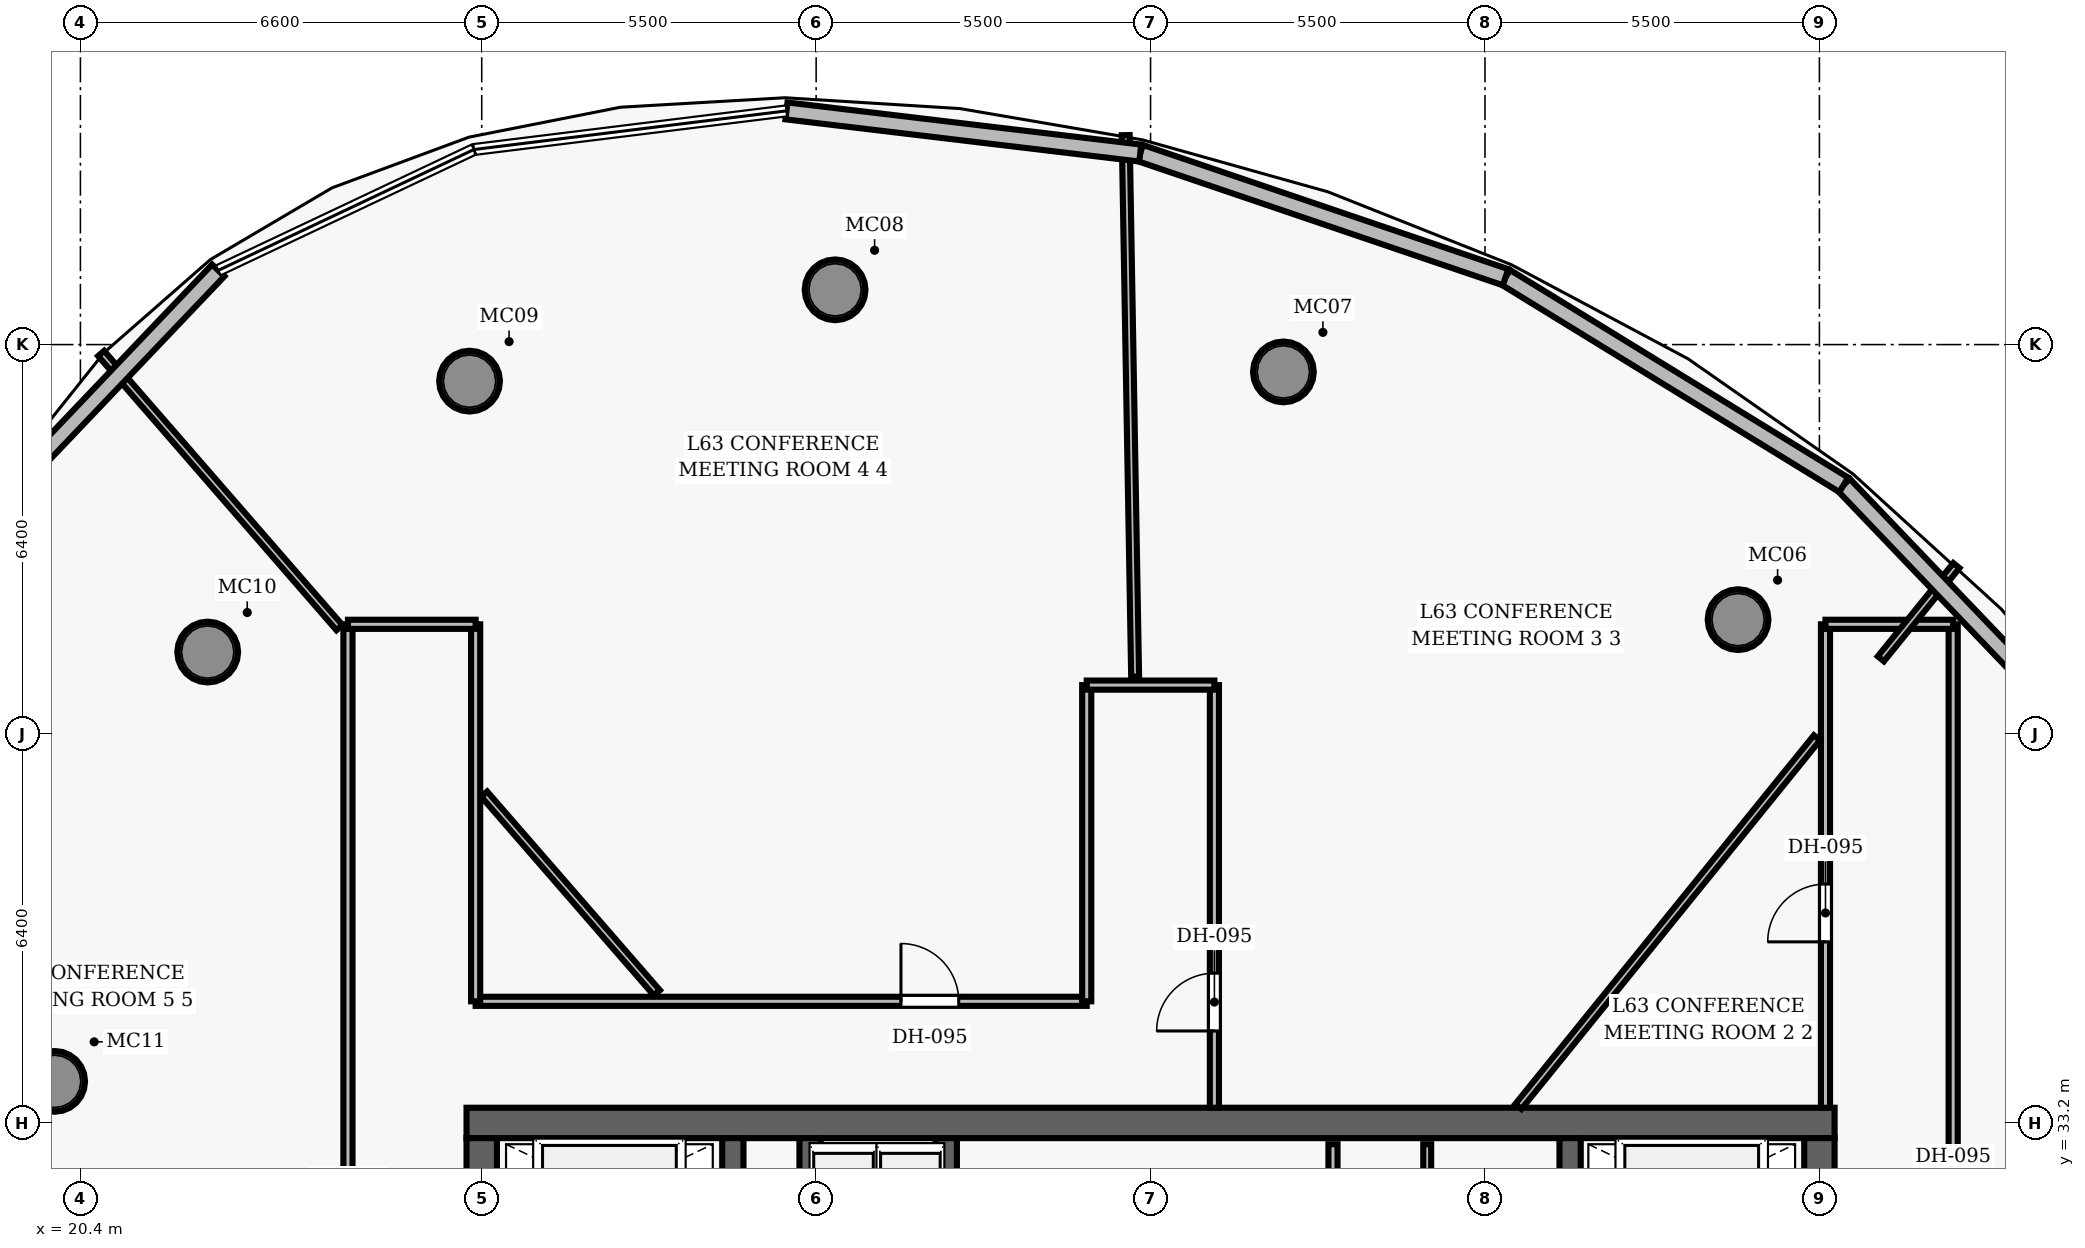
"""IFC4 building model, lengths in metres.
Left out: names, types, materials, properties, quantities, classifications, styles, units other than length and angle.
Written with IfcOpenShell. Run it as: python <this file> out.ifc"""

import sys

from ifc_helpers import new_model, si_unit, direction, frame, frame_2d, origin, origin_2d, place, context, subcontext, project, spatial, rectangle, hollow_circle, extrude, element, fill, save


model = new_model("IFC4")
c1 = context("Model", 3, precision=1e-05, world=origin(), true_north=direction((0.0, 1.0)))
c2 = subcontext(c1, "Body", "Model", "MODEL_VIEW")
j1 = project(units=[si_unit("LENGTHUNIT", "METRE"), si_unit("PLANEANGLEUNIT", "RADIAN")], contexts=[c1])
p1 = place(None, origin())
s1 = spatial("IfcSite", under=j1, at=p1, CompositionType="ELEMENT")
p2 = place(p1, origin())
s2 = spatial("IfcBuilding", under=s1, at=p2, CompositionType="ELEMENT")
p3 = place(p2, frame((0.0, 0.0, 249.75)))
s3 = spatial("IfcBuildingStorey", under=s2, at=p3, CompositionType="ELEMENT", Elevation=249.75)
p4 = place(p3, frame((26.75, 33.2, 0.0), z_axis=(0.0, 0.0, 1.0), x_axis=(1.0, 0.0, 0.0)))
e1 = element("IfcWall", 1, at=p4, inside=s3, PredefinedType="SHEAR", context=c2, shape_type="SweptSolid", body=[
    extrude(rectangle(XDim=22.5, YDim=0.5, at=frame_2d((11.25, 0.0))), origin(), (0.0, 0.0, 1.0), 3.85),
])
p5 = place(p3, frame((27.0, 19.05, 0.0), z_axis=(0.0, 0.0, 1.0), x_axis=(0.0, 1.0, 0.0)))
e2 = element("IfcWall", 2, at=p5, inside=s3, PredefinedType="SHEAR", context=c2, shape_type="SweptSolid", body=[
    extrude(rectangle(XDim=13.9, YDim=0.5, at=frame_2d((6.95, 0.0))), origin(), (0.0, 0.0, 1.0), 3.85),
])
p6 = place(p5, frame((8.2, 0.0, 0.0)))
e3 = element("IfcOpeningElement", 3, at=p6, cuts=e2, PredefinedType="OPENING", context=c2, shape_type="SweptSolid", body=[
    extrude(rectangle(XDim=1.05, YDim=2.15, at=frame_2d((0.525, 1.075))), frame((0.0, 0.26, 0.0), z_axis=(0.0, -1.0, 0.0), x_axis=(1.0, 0.0, 0.0)), (0.0, 0.0, 1.0), 0.52),
])
p7 = place(p3, frame((49.0, 19.05, 0.0), z_axis=(0.0, 0.0, 1.0), x_axis=(0.0, 1.0, 0.0)))
e4 = element("IfcWall", 4, at=p7, inside=s3, PredefinedType="SHEAR", context=c2, shape_type="SweptSolid", body=[
    extrude(rectangle(XDim=13.9, YDim=0.5, at=frame_2d((6.95, 0.0))), origin(), (0.0, 0.0, 1.0), 3.85),
])
p8 = place(p7, frame((8.2, 0.0, 0.0)))
e5 = element("IfcOpeningElement", 5, at=p8, cuts=e4, PredefinedType="OPENING", context=c2, shape_type="SweptSolid", body=[
    extrude(rectangle(XDim=1.05, YDim=2.15, at=frame_2d((0.525, 1.075))), frame((0.0, 0.26, 0.0), z_axis=(0.0, -1.0, 0.0), x_axis=(1.0, 0.0, 0.0)), (0.0, 0.0, 1.0), 0.52),
])
for number, where, z_axis, x_axis in (
    (6, (31.13, 19.05, 0.0), (0.0, 0.0, 1.0), (0.0, 1.0, 0.0)),
    (7, (44.9, 19.05, 0.0), (0.0, 0.0, 1.0), (0.0, 1.0, 0.0)),
):
    element("IfcWall", number, at=place(p3, frame(where, z_axis=z_axis, x_axis=x_axis)), inside=s3, PredefinedType="SHEAR", context=c2, shape_type="SweptSolid", body=[
        extrude(rectangle(XDim=13.9, YDim=0.35, at=frame_2d((6.95, 0.0))), origin(), (0.0, 0.0, 1.0), 3.85),
    ])
for number, where, z_axis, x_axis in (
    (8, (47.662, 41.477, 0.0), (0.0, 0.0, 1.0), (1.0, 0.0, 0.0)),
    (9, (40.185, 45.551, 0.0), (0.0, 0.0, 1.0), (1.0, 0.0, 0.0)),
    (10, (32.812, 46.901, 0.0), (0.0, 0.0, 1.0), (1.0, 0.0, 0.0)),
    (11, (26.8, 45.399, 0.0), (0.0, 0.0, 1.0), (1.0, 0.0, 0.0)),
    (12, (22.494, 40.944, 0.0), (0.0, 0.0, 1.0), (1.0, 0.0, 0.0)),
    (13, (19.976, 33.884, 0.0), (0.0, 0.0, 1.0), (1.0, 0.0, 0.0)),
):
    element("IfcColumn", number, at=place(p3, frame(where, z_axis=z_axis, x_axis=x_axis)), inside=s3, PredefinedType="COLUMN", context=c2, shape_type="SweptSolid", body=[
        extrude(hollow_circle(Radius=0.5, WallThickness=0.045, at=origin_2d()), origin(), (0.0, 0.0, 1.0), 3.85),
    ])
p9 = place(p3, frame((34.64, 26.69, 0.0), z_axis=(0.0, 0.0, 1.0), x_axis=(0.0, 1.0, 0.0)))
e14 = element("IfcWall", 14, at=p9, inside=s3, PredefinedType="SHEAR", context=c2, shape_type="SweptSolid", body=[
    extrude(rectangle(XDim=6.26, YDim=0.35, at=frame_2d((3.13, 0.0))), origin(), (0.0, 0.0, 1.0), 3.85),
])
p10 = place(p9, frame((0.85, 0.0, 0.0)))
e15 = element("IfcOpeningElement", 15, at=p10, cuts=e14, PredefinedType="OPENING", context=c2, shape_type="SweptSolid", body=[
    extrude(rectangle(XDim=1.05, YDim=2.15, at=frame_2d((0.525, 1.075))), frame((0.0, 0.185, 0.0), z_axis=(0.0, -1.0, 0.0), x_axis=(1.0, 0.0, 0.0)), (0.0, 0.0, 1.0), 0.37),
])
p11 = place(p3, frame((32.4, 30.22, 0.0), z_axis=(0.0, 0.0, 1.0), x_axis=(0.0, 1.0, 0.0)))
e16 = element("IfcWall", 16, at=p11, inside=s3, PredefinedType="SHEAR", context=c2, shape_type="SweptSolid", body=[
    extrude(rectangle(XDim=2.73, YDim=0.35, at=frame_2d((1.365, 0.0))), origin(), (0.0, 0.0, 1.0), 3.04),
])
p12 = place(p3, frame((41.0, 28.95, 0.0), z_axis=(0.0, 0.0, 1.0), x_axis=(0.0, 1.0, 0.0)))
e17 = element("IfcWall", 17, at=p12, inside=s3, PredefinedType="PARTITIONING", context=c2, shape_type="SweptSolid", body=[
    extrude(rectangle(XDim=3.9, YDim=0.15, at=frame_2d((1.95, 0.0))), origin(), (0.0, 0.0, 1.0), 3.04),
])
p13 = place(p12, frame((0.7, 0.0, 0.0)))
e18 = element("IfcOpeningElement", 18, at=p13, cuts=e17, PredefinedType="OPENING", context=c2, shape_type="SweptSolid", body=[
    extrude(rectangle(XDim=0.85, YDim=2.1, at=frame_2d((0.425, 1.05))), frame((0.0, 0.085, 0.0), z_axis=(0.0, -1.0, 0.0), x_axis=(1.0, 0.0, 0.0)), (0.0, 0.0, 1.0), 0.17),
])
p14 = place(p3, frame((42.55, 28.1, 0.0), z_axis=(0.0, 0.0, 1.0), x_axis=(0.0, 1.0, 0.0)))
e19 = element("IfcWall", 19, at=p14, inside=s3, PredefinedType="PARTITIONING", context=c2, shape_type="SweptSolid", body=[
    extrude(rectangle(XDim=4.75, YDim=0.13, at=frame_2d((2.375, 0.0))), origin(), (0.0, 0.0, 1.0), 3.04),
])
p15 = place(p14, frame((0.55, 0.0, 0.0)))
e20 = element("IfcOpeningElement", 20, at=p15, cuts=e19, PredefinedType="OPENING", context=c2, shape_type="SweptSolid", body=[
    extrude(rectangle(XDim=0.85, YDim=2.1, at=frame_2d((0.425, 1.05))), frame((0.0, 0.075, 0.0), z_axis=(0.0, -1.0, 0.0), x_axis=(1.0, 0.0, 0.0)), (0.0, 0.0, 1.0), 0.15),
])
p16 = place(p14, frame((2.9, 0.0, 0.0)))
e21 = element("IfcOpeningElement", 21, at=p16, cuts=e19, PredefinedType="OPENING", context=c2, shape_type="SweptSolid", body=[
    extrude(rectangle(XDim=0.85, YDim=2.1, at=frame_2d((0.425, 1.05))), frame((0.0, 0.075, 0.0), z_axis=(0.0, -1.0, 0.0), x_axis=(1.0, 0.0, 0.0)), (0.0, 0.0, 1.0), 0.15),
])
p17 = place(p3, frame((26.9, 35.2, 0.0), z_axis=(0.0, 0.0, 1.0), x_axis=(1.0, 0.0, 0.0)))
e22 = element("IfcWall", 22, at=p17, inside=s3, PredefinedType="PARTITIONING", context=c2, shape_type="SweptSolid", body=[
    extrude(rectangle(XDim=10.05, YDim=0.15, at=frame_2d((5.025, 0.0))), origin(), (0.0, 0.0, 1.0), 3.04),
])
p18 = place(p17, frame((6.995, 0.0, 0.0)))
e23 = element("IfcOpeningElement", 23, at=p18, cuts=e22, PredefinedType="OPENING", context=c2, shape_type="SweptSolid", body=[
    extrude(rectangle(XDim=0.95, YDim=2.15, at=frame_2d((0.475, 1.075))), frame((0.0, 0.085, 0.0), z_axis=(0.0, -1.0, 0.0), x_axis=(1.0, 0.0, 0.0)), (0.0, 0.0, 1.0), 0.17),
])
p19 = place(p3, frame((24.8, 11.306, 0.0), z_axis=(0.0, 0.0, 1.0), x_axis=(0.0, 1.0, 0.0)))
e24 = element("IfcWall", 24, at=p19, inside=s3, PredefinedType="PARTITIONING", context=c2, shape_type="SweptSolid", body=[
    extrude(rectangle(XDim=30.094, YDim=0.15, at=frame_2d((15.047, 0.0))), origin(), (0.0, 0.0, 1.0), 3.04),
])
p20 = place(p19, frame((19.429, 0.0, 0.0)))
e25 = element("IfcOpeningElement", 25, at=p20, cuts=e24, PredefinedType="OPENING", context=c2, shape_type="SweptSolid", body=[
    extrude(rectangle(XDim=0.95, YDim=2.15, at=frame_2d((0.475, 1.075))), frame((0.0, 0.085, 0.0), z_axis=(0.0, -1.0, 0.0), x_axis=(1.0, 0.0, 0.0)), (0.0, 0.0, 1.0), 0.17),
])
p21 = place(p19, frame((10.994, 0.0, 0.0)))
e26 = element("IfcOpeningElement", 26, at=p21, cuts=e24, PredefinedType="OPENING", context=c2, shape_type="SweptSolid", body=[
    extrude(rectangle(XDim=1.5, YDim=2.2, at=frame_2d((0.75, 1.1))), frame((0.0, 0.085, 0.0), z_axis=(0.0, -1.0, 0.0), x_axis=(1.0, 0.0, 0.0)), (0.0, 0.0, 1.0), 0.17),
])
p22 = place(p3, frame((26.9, 35.2, 0.0), z_axis=(0.0, 0.0, 1.0), x_axis=(0.0, 1.0, 0.0)))
e27 = element("IfcWall", 27, at=p22, inside=s3, PredefinedType="PARTITIONING", context=c2, shape_type="SweptSolid", body=[
    extrude(rectangle(XDim=6.2, YDim=0.15, at=frame_2d((3.1, 0.0))), origin(), (0.0, 0.0, 1.0), 3.04),
])
p23 = place(p3, frame((24.8, 41.4, 0.0), z_axis=(0.0, 0.0, 1.0), x_axis=(1.0, 0.0, 0.0)))
e28 = element("IfcWall", 28, at=p23, inside=s3, PredefinedType="PARTITIONING", context=c2, shape_type="SweptSolid", body=[
    extrude(rectangle(XDim=2.1, YDim=0.15, at=frame_2d((1.05, 0.0))), origin(), (0.0, 0.0, 1.0), 3.04),
])
p24 = place(p3, frame((51.2, 10.6, 0.0), z_axis=(0.0, 0.0, 1.0), x_axis=(0.0, 1.0, 0.0)))
e29 = element("IfcWall", 29, at=p24, inside=s3, PredefinedType="PARTITIONING", context=c2, shape_type="SweptSolid", body=[
    extrude(rectangle(XDim=30.8, YDim=0.15, at=frame_2d((15.4, 0.0))), origin(), (0.0, 0.0, 1.0), 3.04),
])
p25 = place(p24, frame((20.494, 0.0, 0.0)))
e30 = element("IfcOpeningElement", 30, at=p25, cuts=e29, PredefinedType="OPENING", context=c2, shape_type="SweptSolid", body=[
    extrude(rectangle(XDim=0.95, YDim=2.15, at=frame_2d((0.475, 1.075))), frame((0.0, 0.085, 0.0), z_axis=(0.0, -1.0, 0.0), x_axis=(1.0, 0.0, 0.0)), (0.0, 0.0, 1.0), 0.17),
])
p26 = place(p24, frame((10.941, 0.0, 0.0)))
e31 = element("IfcOpeningElement", 31, at=p26, cuts=e29, PredefinedType="OPENING", context=c2, shape_type="SweptSolid", body=[
    extrude(rectangle(XDim=0.95, YDim=2.15, at=frame_2d((0.475, 1.075))), frame((0.0, 0.085, 0.0), z_axis=(0.0, -1.0, 0.0), x_axis=(1.0, 0.0, 0.0)), (0.0, 0.0, 1.0), 0.17),
])
p27 = place(p3, frame((49.1, 33.45, 0.0), z_axis=(0.0, 0.0, 1.0), x_axis=(0.0, 1.0, 0.0)))
e32 = element("IfcWall", 32, at=p27, inside=s3, PredefinedType="PARTITIONING", context=c2, shape_type="SweptSolid", body=[
    extrude(rectangle(XDim=7.95, YDim=0.15, at=frame_2d((3.975, 0.0))), origin(), (0.0, 0.0, 1.0), 3.04),
])
p28 = place(p27, frame((2.728, 0.0, 0.0)))
e33 = element("IfcOpeningElement", 33, at=p28, cuts=e32, PredefinedType="OPENING", context=c2, shape_type="SweptSolid", body=[
    extrude(rectangle(XDim=0.95, YDim=2.15, at=frame_2d((0.475, 1.075))), frame((0.0, 0.085, 0.0), z_axis=(0.0, -1.0, 0.0), x_axis=(1.0, 0.0, 0.0)), (0.0, 0.0, 1.0), 0.17),
])
p29 = place(p3, frame((49.1, 41.4, 0.0), z_axis=(0.0, 0.0, 1.0), x_axis=(1.0, 0.0, 0.0)))
e34 = element("IfcWall", 34, at=p29, inside=s3, PredefinedType="PARTITIONING", context=c2, shape_type="SweptSolid", body=[
    extrude(rectangle(XDim=2.1, YDim=0.15, at=frame_2d((1.05, 0.0))), origin(), (0.0, 0.0, 1.0), 3.04),
])
p30 = place(p3, frame((36.95, 35.2, 0.0), z_axis=(0.0, 0.0, 1.0), x_axis=(0.0, 1.0, 0.0)))
e35 = element("IfcWall", 35, at=p30, inside=s3, PredefinedType="PARTITIONING", context=c2, shape_type="SweptSolid", body=[
    extrude(rectangle(XDim=5.2, YDim=0.15, at=frame_2d((2.6, 0.0))), origin(), (0.0, 0.0, 1.0), 3.04),
])
p31 = place(p3, frame((39.05, 33.45, 0.0), z_axis=(0.0, 0.0, 1.0), x_axis=(0.0, 1.0, 0.0)))
e36 = element("IfcWall", 36, at=p31, inside=s3, PredefinedType="PARTITIONING", context=c2, shape_type="SweptSolid", body=[
    extrude(rectangle(XDim=6.95, YDim=0.15, at=frame_2d((3.475, 0.0))), origin(), (0.0, 0.0, 1.0), 3.04),
])
p32 = place(p31, frame((1.262, 0.0, 0.0)))
e37 = element("IfcOpeningElement", 37, at=p32, cuts=e36, PredefinedType="OPENING", context=c2, shape_type="SweptSolid", body=[
    extrude(rectangle(XDim=0.95, YDim=2.15, at=frame_2d((0.475, 1.075))), frame((0.0, 0.085, 0.0), z_axis=(0.0, -1.0, 0.0), x_axis=(1.0, 0.0, 0.0)), (0.0, 0.0, 1.0), 0.17),
])
p33 = place(p3, frame((36.95, 40.4, 0.0), z_axis=(0.0, 0.0, 1.0), x_axis=(1.0, 0.0, 0.0)))
e38 = element("IfcWall", 38, at=p33, inside=s3, PredefinedType="PARTITIONING", context=c2, shape_type="SweptSolid", body=[
    extrude(rectangle(XDim=2.1, YDim=0.15, at=frame_2d((1.05, 0.0))), origin(), (0.0, 0.0, 1.0), 3.04),
])
p34 = place(p3, frame((44.049, 33.47, 0.0), z_axis=(0.0, 0.0, 1.0), x_axis=(0.629319722443, 0.777146502883, 0.0)))
e39 = element("IfcWall", 39, at=p34, inside=s3, PredefinedType="PARTITIONING", context=c2, shape_type="SweptSolid", body=[
    extrude(rectangle(XDim=7.803, YDim=0.13, at=frame_2d((3.902, 0.0))), origin(), (0.0, 0.0, 1.0), 3.04),
])
p35 = place(p3, frame((50.011, 40.832, 0.0), z_axis=(0.0, 0.0, 1.0), x_axis=(0.629255162261, 0.777198778157, 0.0)))
e40 = element("IfcWall", 40, at=p35, inside=s3, PredefinedType="PARTITIONING", context=c2, shape_type="SweptSolid", body=[
    extrude(rectangle(XDim=1.974, YDim=0.13, at=frame_2d((0.987, 0.0))), origin(), (0.0, 0.0, 1.0), 3.04),
])
p36 = place(p3, frame((37.746, 40.54, 0.0), z_axis=(0.0, 0.0, 1.0), x_axis=(-0.017434428184, 0.999848008806, 0.0)))
e41 = element("IfcWall", 41, at=p36, inside=s3, PredefinedType="PARTITIONING", context=c2, shape_type="SweptSolid", body=[
    extrude(rectangle(XDim=8.906, YDim=0.13, at=frame_2d((4.453, 0.0))), origin(), (0.0, 0.0, 1.0), 3.04),
])
p37 = place(p3, frame((29.881, 35.34, 0.0), z_axis=(0.0, 0.0, 1.0), x_axis=(-0.656078202057, 0.754692912903, 0.0)))
e42 = element("IfcWall", 42, at=p37, inside=s3, PredefinedType="PARTITIONING", context=c2, shape_type="SweptSolid", body=[
    extrude(rectangle(XDim=4.33, YDim=0.13, at=frame_2d((2.165, 0.0))), origin(), (0.0, 0.0, 1.0), 3.04),
])
p38 = place(p3, frame((24.66, 41.346, 0.0), z_axis=(0.0, 0.0, 1.0), x_axis=(-0.656059320553, 0.754709326771, 0.0)))
e43 = element("IfcWall", 43, at=p38, inside=s3, PredefinedType="PARTITIONING", context=c2, shape_type="SweptSolid", body=[
    extrude(rectangle(XDim=5.974, YDim=0.13, at=frame_2d((2.987, 0.0))), origin(), (0.0, 0.0, 1.0), 3.04),
])
p39 = place(p3, frame((49.4, 43.694, 0.0), z_axis=(0.0, 0.0, 1.0), x_axis=(0.691260013962, -0.722606111998, 0.0)))
e44 = element("IfcWall", 44, at=p39, inside=s3, PredefinedType="SOLIDWALL", context=c2, shape_type="SweptSolid", body=[
    extrude(rectangle(XDim=6.527, YDim=0.28, at=frame_2d((3.263, 0.0))), origin(), (0.0, 0.0, 1.0), 3.625),
])
p40 = place(p3, frame((43.838, 47.108, 0.0), z_axis=(0.0, 0.0, 1.0), x_axis=(0.852253742536, -0.523128625038, 0.0)))
e45 = element("IfcWall", 45, at=p40, inside=s3, PredefinedType="SOLIDWALL", context=c2, shape_type="SweptSolid", body=[
    extrude(rectangle(XDim=6.526, YDim=0.28, at=frame_2d((3.263, 0.0))), origin(), (0.0, 0.0, 1.0), 3.625),
])
p41 = place(p3, frame((37.831, 49.15, 0.0), z_axis=(0.0, 0.0, 1.0), x_axis=(0.946816357847, -0.321774431107, 0.0)))
e46 = element("IfcWall", 46, at=p41, inside=s3, PredefinedType="SOLIDWALL", context=c2, shape_type="SweptSolid", body=[
    extrude(rectangle(XDim=6.345, YDim=0.28, at=frame_2d((3.173, 0.0))), origin(), (0.0, 0.0, 1.0), 3.625),
])
p42 = place(p3, frame((32.012, 49.843, 0.0), z_axis=(0.0, 0.0, 1.0), x_axis=(0.992975459994, -0.118320479415, 0.0)))
e47 = element("IfcWall", 47, at=p42, inside=s3, PredefinedType="SOLIDWALL", context=c2, shape_type="SweptSolid", body=[
    extrude(rectangle(XDim=5.86, YDim=0.28, at=frame_2d((2.93, 0.0))), origin(), (0.0, 0.0, 1.0), 3.625),
])
p43 = place(p3, frame((19.46, 43.853, 0.0), z_axis=(0.0, 0.0, 1.0), x_axis=(0.68967745757, 0.724116706422, 0.0)))
e48 = element("IfcWall", 48, at=p43, inside=s3, PredefinedType="SOLIDWALL", context=c2, shape_type="SweptSolid", body=[
    extrude(rectangle(XDim=4.65, YDim=0.28, at=frame_2d((2.325, 0.0))), origin(), (0.0, 0.0, 1.0), 3.625),
])
p44 = place(p28, origin())
e49 = element("IfcDoor", 49, at=p44, inside=s3, OperationType="SINGLE_SWING_LEFT", PredefinedType="DOOR", context=c2, shape_type="SweptSolid", body=[
    extrude(rectangle(XDim=0.95, YDim=2.15, at=frame_2d((0.475, 1.075))), frame((0.0, 0.025, 0.0), z_axis=(0.0, -1.0, 0.0), x_axis=(1.0, 0.0, 0.0)), (0.0, 0.0, 1.0), 0.05),
])
fill(e33, e49)
p45 = place(p32, origin())
e50 = element("IfcDoor", 50, at=p45, inside=s3, OperationType="SINGLE_SWING_LEFT", PredefinedType="DOOR", context=c2, shape_type="SweptSolid", body=[
    extrude(rectangle(XDim=0.95, YDim=2.15, at=frame_2d((0.475, 1.075))), frame((0.0, 0.025, 0.0), z_axis=(0.0, -1.0, 0.0), x_axis=(1.0, 0.0, 0.0)), (0.0, 0.0, 1.0), 0.05),
])
fill(e37, e50)
p46 = place(p18, origin())
e51 = element("IfcDoor", 51, at=p46, inside=s3, OperationType="SINGLE_SWING_LEFT", PredefinedType="DOOR", context=c2, shape_type="SweptSolid", body=[
    extrude(rectangle(XDim=0.95, YDim=2.15, at=frame_2d((0.475, 1.075))), frame((0.0, 0.025, 0.0), z_axis=(0.0, -1.0, 0.0), x_axis=(1.0, 0.0, 0.0)), (0.0, 0.0, 1.0), 0.05),
])
fill(e23, e51)
save(model, sys.argv[1])
